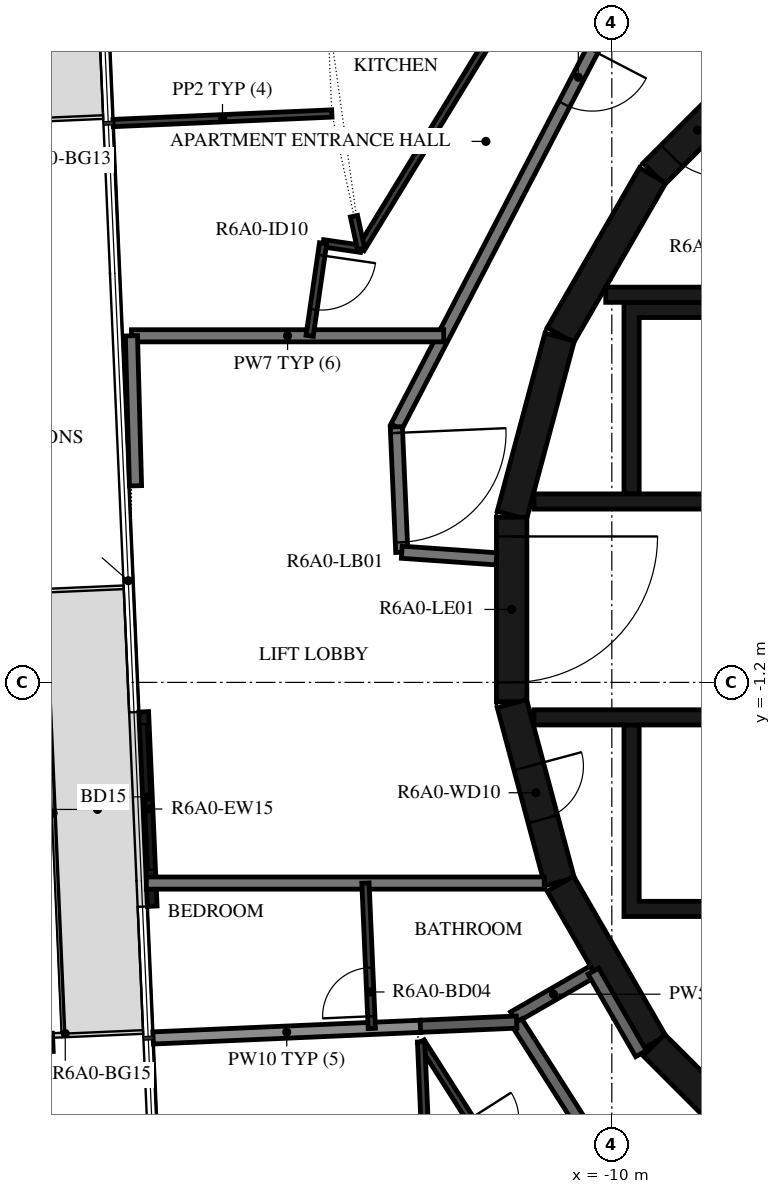
"""IFC4 building model, lengths in metres.
Left out: names, types, materials, properties, quantities, classifications, styles, units other than length and angle.
Written with IfcOpenShell. Run it as: python <this file> out.ifc"""

import sys

from ifc_helpers import new_model, si_unit, direction, frame, frame_2d, origin, origin_2d, place, context, subcontext, project, spatial, polyline, rectangle, i_section, outline, extrude, element, fill, save


model = new_model("IFC4")
c1 = context("Model", 3, precision=1e-05, world=origin(), true_north=direction((0.0, 1.0)))
c2 = subcontext(c1, "Body", "Model", "MODEL_VIEW")
j1 = project(units=[si_unit("LENGTHUNIT", "METRE"), si_unit("PLANEANGLEUNIT", "RADIAN")], contexts=[c1])
p1 = place(None, origin())
s1 = spatial("IfcSite", under=j1, at=p1, CompositionType="ELEMENT")
p2 = place(p1, origin())
s2 = spatial("IfcBuilding", under=s1, at=p2, CompositionType="ELEMENT")
p3 = place(p2, frame((0.0, 0.0, 233.7)))
s3 = spatial("IfcBuildingStorey", under=s2, at=p3, CompositionType="ELEMENT", Elevation=233.7)
p4 = place(p3, frame((-19.642, -7.139, -0.38), z_axis=(0.0, 0.0, 1.0), x_axis=(-0.043619010384, 0.999048238041, 0.0)))
e1 = element("IfcColumn", 1, at=p4, inside=s3, PredefinedType="COLUMN", context=c2, shape_type="SweptSolid", body=[
    extrude(i_section(OverallWidth=0.3, OverallDepth=0.9, WebThickness=0.019, FlangeThickness=0.035, FilletRadius=0.03, at=origin_2d()), origin(), (0.0, 0.0, 1.0), 3.5),
])
p5 = place(p3, frame((-17.698, -1.684, 0.0), z_axis=(0.0, 0.0, 1.0), x_axis=(0.043639181999, -0.999047357133, 0.0)))
e2 = element("IfcWall", 2, at=p5, inside=s3, PredefinedType="STANDARD", context=c2, shape_type="SweptSolid", body=[
    extrude(rectangle(XDim=3.2, YDim=0.16, at=frame_2d((1.6, 0.0))), origin(), (0.0, 0.0, 1.0), 3.12),
])
p6 = place(p5, frame((0.2, 0.0, 0.0)))
e3 = element("IfcOpeningElement", 3, at=p6, cuts=e2, PredefinedType="OPENING", context=c2, shape_type="SweptSolid", body=[
    extrude(rectangle(XDim=2.4, YDim=2.4, at=frame_2d((1.2, 1.2))), frame((0.0, 0.09, 0.0), z_axis=(0.0, -1.0, 0.0), x_axis=(1.0, 0.0, 0.0)), (0.0, 0.0, 1.0), 0.18),
])
p7 = place(p3, frame((-7.164, 9.308, 0.0), z_axis=(0.0, 0.0, 1.0), x_axis=(-0.707106781187, -0.707106781187, 0.0)))
e4 = element("IfcWall", 4, at=p7, inside=s3, PredefinedType="SHEAR", context=c2, shape_type="SweptSolid", body=[
    extrude(rectangle(XDim=3.032, YDim=0.5, at=frame_2d((1.516, 0.0))), origin(), (0.0, 0.0, 1.0), 3.12),
])
p8 = place(p7, frame((1.416, 0.0, 0.0)))
e5 = element("IfcOpeningElement", 5, at=p8, cuts=e4, PredefinedType="OPENING", context=c2, shape_type="SweptSolid", body=[
    extrude(rectangle(XDim=1.2, YDim=2.1, at=frame_2d((0.6, 1.05))), frame((0.0, 0.26, 0.0), z_axis=(0.0, -1.0, 0.0), x_axis=(1.0, 0.0, 0.0)), (0.0, 0.0, 1.0), 0.52),
])
for number, where, z_axis, x_axis in (
    (6, (-9.329, 7.137, 0.0), (0.0, 0.0, 1.0), (-0.5, -0.866, 0.0)),
    (7, (-10.858, 4.479, 0.0), (0.0, 0.0, 1.0), (-0.259, -0.966, 0.0)),
):
    element("IfcWall", number, at=place(p3, frame(where, z_axis=z_axis, x_axis=x_axis)), inside=s3, PredefinedType="SHEAR", context=c2, shape_type="SweptSolid", body=[
        extrude(rectangle(XDim=3.033, YDim=0.5, at=frame_2d((1.516, 0.0))), origin(), (0.0, 0.0, 1.0), 3.12),
    ])
p9 = place(p3, frame((-11.647, 1.516, 0.0), z_axis=(0.0, 0.0, 1.0), x_axis=(0.0, -1.0, 0.0)))
e8 = element("IfcWall", 8, at=p9, inside=s3, PredefinedType="SHEAR", context=c2, shape_type="SweptSolid", body=[
    extrude(rectangle(XDim=3.033, YDim=0.5, at=frame_2d((1.516, 0.0))), origin(), (0.0, 0.0, 1.0), 3.12),
])
p10 = place(p9, frame((0.316, 0.0, 0.0)))
e9 = element("IfcOpeningElement", 9, at=p10, cuts=e8, PredefinedType="OPENING", context=c2, shape_type="SweptSolid", body=[
    extrude(rectangle(XDim=2.4, YDim=2.1, at=frame_2d((1.2, 1.05))), frame((0.0, 0.26, 0.0), z_axis=(0.0, -1.0, 0.0), x_axis=(1.0, 0.0, 0.0)), (0.0, 0.0, 1.0), 0.52),
])
p11 = place(p3, frame((-11.643, -1.55, 0.0), z_axis=(0.0, 0.0, 1.0), x_axis=(0.258734743916, -0.965948410781, 0.0)))
e10 = element("IfcWall", 10, at=p11, inside=s3, PredefinedType="SHEAR", context=c2, shape_type="SweptSolid", body=[
    extrude(rectangle(XDim=3.033, YDim=0.5, at=frame_2d((1.516, 0.0))), origin(), (0.0, 0.0, 1.0), 3.12),
])
p12 = place(p11, frame((1.066, 0.0, 0.0)))
e11 = element("IfcOpeningElement", 11, at=p12, cuts=e10, PredefinedType="OPENING", context=c2, shape_type="SweptSolid", body=[
    extrude(rectangle(XDim=0.9, YDim=2.1, at=frame_2d((0.45, 1.05))), frame((0.0, 0.26, 0.0), z_axis=(0.0, -1.0, 0.0), x_axis=(1.0, 0.0, 0.0)), (0.0, 0.0, 1.0), 0.52),
])
p13 = place(p3, frame((-10.845, -4.51, 0.0), z_axis=(0.0, 0.0, 1.0), x_axis=(0.500087131594, -0.865975092491, 0.0)))
e12 = element("IfcWall", 12, at=p13, inside=s3, PredefinedType="SHEAR", context=c2, shape_type="SweptSolid", body=[
    extrude(rectangle(XDim=3.033, YDim=0.5, at=frame_2d((1.516, 0.0))), origin(), (0.0, 0.0, 1.0), 3.12),
])
p14 = place(p3, frame((-9.308, -7.164, 0.0), z_axis=(0.0, 0.0, 1.0), x_axis=(0.707106781187, -0.707106781187, 0.0)))
e13 = element("IfcWall", 13, at=p14, inside=s3, PredefinedType="SHEAR", context=c2, shape_type="SweptSolid", body=[
    extrude(rectangle(XDim=3.032, YDim=0.5, at=frame_2d((1.516, 0.0))), origin(), (0.0, 0.0, 1.0), 3.12),
])
p15 = place(p3, frame((-7.0, 5.175, 0.0), z_axis=(0.0, 0.0, 1.0), x_axis=(-1.0, 0.0, 0.0)))
e14 = element("IfcWall", 14, at=p15, inside=s3, PredefinedType="SHEAR", context=c2, shape_type="SweptSolid", body=[
    extrude(rectangle(XDim=3.1, YDim=0.25, at=frame_2d((1.55, 0.0))), origin(), (0.0, 0.0, 1.0), 3.12),
])
p16 = place(p3, origin())
e15 = element("IfcWall", 15, at=p16, inside=s3, PredefinedType="SHEAR", context=c2, shape_type="SweptSolid", body=[
    extrude(outline(polyline([(-9.55, 4.8), (-5.5, 4.8), (-5.5, 1.9), (-5.25, 1.9), (-5.25, 4.8), (-1.2, 4.8), (-1.2, 1.9), (-0.95, 1.9), (-0.95, 4.8), (0.95, 4.8), (0.95, 1.9), (1.2, 1.9), (1.2, 4.8), (3.1, 4.8), (3.1, 1.9), (3.35, 1.9), (3.35, 4.8), (5.25, 4.8), (5.25, 1.9), (5.5, 1.9), (5.5, 4.8), (7.4, 4.8), (7.4, 1.9), (7.65, 1.9), (7.65, 4.8), (9.55, 4.8), (9.55, 1.9), (9.8, 1.9), (9.8, 4.8), (9.8, 5.05), (-9.8, 5.05), (-9.8, 4.8), (-9.8, 1.9), (-9.55, 1.9), (-9.55, 4.8)])), origin(), (0.0, 0.0, 1.0), 3.12),
])
p17 = place(p3, origin())
e16 = element("IfcWall", 16, at=p17, inside=s3, PredefinedType="SHEAR", context=c2, shape_type="SweptSolid", body=[
    extrude(outline(polyline([(9.8, -5.05), (9.8, -4.8), (9.8, -1.9), (9.55, -1.9), (9.55, -4.8), (7.65, -4.8), (7.65, -1.9), (7.4, -1.9), (7.4, -4.8), (5.5, -4.8), (5.5, -1.9), (5.25, -1.9), (5.25, -4.8), (3.35, -4.8), (3.35, -1.9), (3.1, -1.9), (3.1, -4.8), (1.2, -4.8), (1.2, -1.9), (0.95, -1.9), (0.95, -4.8), (-0.95, -4.8), (-0.95, -1.9), (-1.2, -1.9), (-1.2, -4.8), (-5.25, -4.8), (-5.25, -1.9), (-5.5, -1.9), (-5.5, -4.8), (-7.4, -4.8), (-7.4, -1.9), (-7.65, -1.9), (-7.65, -4.8), (-9.55, -4.8), (-9.55, -1.9), (-9.8, -1.9), (-9.8, -4.8), (-9.8, -5.05), (9.8, -5.05)])), origin(), (0.0, 0.0, 1.0), 3.12),
])
p18 = place(p3, frame((-11.28, 1.775, 0.0), z_axis=(0.0, 0.0, 1.0), x_axis=(1.0, 0.0, 0.0)))
e17 = element("IfcWall", 17, at=p18, inside=s3, PredefinedType="SHEAR", context=c2, shape_type="SweptSolid", body=[
    extrude(rectangle(XDim=14.38, YDim=0.25, at=frame_2d((7.19, 0.0))), origin(), (0.0, 0.0, 1.0), 3.12),
])
p19 = place(p18, frame((10.73, 0.0, 0.0)))
e18 = element("IfcOpeningElement", 18, at=p19, cuts=e17, PredefinedType="OPENING", context=c2, shape_type="SweptSolid", body=[
    extrude(rectangle(XDim=1.1, YDim=2.1, at=frame_2d((0.55, 1.05))), frame((0.0, 0.135, 0.0), z_axis=(0.0, -1.0, 0.0), x_axis=(1.0, 0.0, 0.0)), (0.0, 0.0, 1.0), 0.27),
])
p20 = place(p18, frame((12.88, 0.0, 0.0)))
e19 = element("IfcOpeningElement", 19, at=p20, cuts=e17, PredefinedType="OPENING", context=c2, shape_type="SweptSolid", body=[
    extrude(rectangle(XDim=1.1, YDim=2.1, at=frame_2d((0.55, 1.05))), frame((0.0, 0.135, 0.0), z_axis=(0.0, -1.0, 0.0), x_axis=(1.0, 0.0, 0.0)), (0.0, 0.0, 1.0), 0.27),
])
p21 = place(p18, frame((3.305, 0.0, 0.0)))
e20 = element("IfcOpeningElement", 20, at=p21, cuts=e17, PredefinedType="OPENING", context=c2, shape_type="SweptSolid", body=[
    extrude(rectangle(XDim=0.9, YDim=2.1, at=frame_2d((0.45, 1.05))), frame((0.0, 0.135, 0.0), z_axis=(0.0, -1.0, 0.0), x_axis=(1.0, 0.0, 0.0)), (0.0, 0.0, 1.0), 0.27),
])
p22 = place(p18, frame((7.605, 0.0, 0.0)))
e21 = element("IfcOpeningElement", 21, at=p22, cuts=e17, PredefinedType="OPENING", context=c2, shape_type="SweptSolid", body=[
    extrude(rectangle(XDim=0.9, YDim=2.1, at=frame_2d((0.45, 1.05))), frame((0.0, 0.135, 0.0), z_axis=(0.0, -1.0, 0.0), x_axis=(1.0, 0.0, 0.0)), (0.0, 0.0, 1.0), 0.27),
])
p23 = place(p3, frame((-11.28, -1.775, 0.0), z_axis=(0.0, 0.0, 1.0), x_axis=(1.0, 0.0, 0.0)))
e22 = element("IfcWall", 22, at=p23, inside=s3, PredefinedType="SHEAR", context=c2, shape_type="SweptSolid", body=[
    extrude(rectangle(XDim=14.38, YDim=0.25, at=frame_2d((7.19, 0.0))), origin(), (0.0, 0.0, 1.0), 3.12),
])
p24 = place(p23, frame((12.88, 0.0, 0.0)))
e23 = element("IfcOpeningElement", 23, at=p24, cuts=e22, PredefinedType="OPENING", context=c2, shape_type="SweptSolid", body=[
    extrude(rectangle(XDim=1.1, YDim=2.1, at=frame_2d((0.55, 1.05))), frame((0.0, 0.135, 0.0), z_axis=(0.0, -1.0, 0.0), x_axis=(1.0, 0.0, 0.0)), (0.0, 0.0, 1.0), 0.27),
])
p25 = place(p23, frame((7.605, 0.0, 0.0)))
e24 = element("IfcOpeningElement", 24, at=p25, cuts=e22, PredefinedType="OPENING", context=c2, shape_type="SweptSolid", body=[
    extrude(rectangle(XDim=0.9, YDim=2.1, at=frame_2d((0.45, 1.05))), frame((0.0, 0.135, 0.0), z_axis=(0.0, -1.0, 0.0), x_axis=(1.0, 0.0, 0.0)), (0.0, 0.0, 1.0), 0.27),
])
p26 = place(p23, frame((10.83, 0.0, 0.0)))
e25 = element("IfcOpeningElement", 25, at=p26, cuts=e22, PredefinedType="OPENING", context=c2, shape_type="SweptSolid", body=[
    extrude(rectangle(XDim=0.9, YDim=2.1, at=frame_2d((0.45, 1.05))), frame((0.0, 0.135, 0.0), z_axis=(0.0, -1.0, 0.0), x_axis=(1.0, 0.0, 0.0)), (0.0, 0.0, 1.0), 0.27),
])
p27 = place(p3, frame((-10.228, 9.372, 0.0), z_axis=(0.0, 0.0, 1.0), x_axis=(-0.461759464021, -0.887005184532, 0.0)))
e26 = element("IfcWall", 26, at=p27, inside=s3, PredefinedType="STANDARD", context=c2, shape_type="SweptSolid", body=[
    extrude(rectangle(XDim=7.181, YDim=0.2, at=frame_2d((3.591, 0.0))), origin(), (0.0, 0.0, 1.0), 3.12),
])
p28 = place(p27, frame((0.2, 0.0, 0.0)))
e27 = element("IfcOpeningElement", 27, at=p28, cuts=e26, PredefinedType="OPENING", context=c2, shape_type="SweptSolid", body=[
    extrude(rectangle(XDim=1.0, YDim=2.1, at=frame_2d((0.5, 1.05))), frame((0.0, 0.11, 0.0), z_axis=(0.0, -1.0, 0.0), x_axis=(1.0, 0.0, 0.0)), (0.0, 0.0, 1.0), 0.22),
])
p29 = place(p3, frame((-13.544, 3.003, 0.0), z_axis=(0.0, 0.0, 1.0), x_axis=(0.043652842459, -0.99904676034, 0.0)))
e28 = element("IfcWall", 28, at=p29, inside=s3, PredefinedType="STANDARD", context=c2, shape_type="SweptSolid", body=[
    extrude(rectangle(XDim=2.064, YDim=0.2, at=frame_2d((1.032, 0.0))), origin(), (0.0, 0.0, 1.0), 3.12),
])
p30 = place(p29, frame((0.1, 0.0, 0.0)))
e29 = element("IfcOpeningElement", 29, at=p30, cuts=e28, PredefinedType="OPENING", context=c2, shape_type="SweptSolid", body=[
    extrude(rectangle(XDim=1.8, YDim=2.1, at=frame_2d((0.9, 1.05))), frame((0.0, 0.11, 0.0), z_axis=(0.0, -1.0, 0.0), x_axis=(1.0, 0.0, 0.0)), (0.0, 0.0, 1.0), 0.22),
])
p31 = place(p3, frame((-13.454, 0.941, 0.0), z_axis=(0.0, 0.0, 1.0), x_axis=(0.99755155062, -0.069934997354, 0.0)))
e30 = element("IfcWall", 30, at=p31, inside=s3, PredefinedType="STANDARD", context=c2, shape_type="SweptSolid", body=[
    extrude(rectangle(XDim=1.561, YDim=0.2, at=frame_2d((0.78, 0.0))), origin(), (0.0, 0.0, 1.0), 3.12),
])
p32 = place(p3, frame((-10.303, -5.949, 0.0), z_axis=(0.0, 0.0, 1.0), x_axis=(-0.866043382451, -0.499968858743, 0.0)))
e31 = element("IfcWall", 31, at=p32, inside=s3, PredefinedType="STANDARD", context=c2, shape_type="SweptSolid", body=[
    extrude(rectangle(XDim=1.515, YDim=0.2, at=frame_2d((0.758, 0.0))), origin(), (0.0, 0.0, 1.0), 3.12),
])
p33 = place(p3, frame((-9.52, -7.305, 0.0), z_axis=(0.0, 0.0, 1.0), x_axis=(-0.500028278809, 0.866009076391, 0.0)))
e32 = element("IfcWall", 32, at=p33, inside=s3, PredefinedType="STANDARD", context=c2, shape_type="SweptSolid", body=[
    extrude(rectangle(XDim=1.566, YDim=0.2, at=frame_2d((0.783, 0.0))), origin(), (0.0, 0.0, 1.0), 3.12),
])
p34 = place(p3, frame((-11.565, -6.786, 0.0), z_axis=(0.0, 0.0, 1.0), x_axis=(0.537297327359, -0.843392898958, 0.0)))
e33 = element("IfcWall", 33, at=p34, inside=s3, PredefinedType="STANDARD", context=c2, shape_type="SweptSolid", body=[
    extrude(rectangle(XDim=4.081, YDim=0.2, at=frame_2d((2.041, 0.0))), origin(), (0.0, 0.0, 1.0), 3.12),
])
p35 = place(p3, frame((-12.764, 4.5, 0.0), z_axis=(0.0, 0.0, 1.0), x_axis=(-1.0, 0.0, 0.0)))
e34 = element("IfcWall", 34, at=p35, inside=s3, PredefinedType="STANDARD", context=c2, shape_type="SweptSolid", body=[
    extrude(rectangle(XDim=5.135, YDim=0.2, at=frame_2d((2.568, 0.0))), origin(), (0.0, 0.0, 1.0), 3.12),
])
p36 = place(p3, frame((-17.9, 4.5, 0.0), z_axis=(0.0, 0.0, 1.0), x_axis=(0.027204178319, -0.999629897853, 0.0)))
e35 = element("IfcWall", 35, at=p36, inside=s3, PredefinedType="STANDARD", context=c2, shape_type="SweptSolid", body=[
    extrude(rectangle(XDim=2.468, YDim=0.2, at=frame_2d((1.234, 0.0))), origin(), (0.0, 0.0, 1.0), 3.12),
])
p37 = place(p3, frame((-17.655, -4.5, 0.0), z_axis=(0.0, 0.0, 1.0), x_axis=(1.0, 0.0, 0.0)))
e36 = element("IfcWall", 36, at=p37, inside=s3, PredefinedType="STANDARD", context=c2, shape_type="SweptSolid", body=[
    extrude(rectangle(XDim=6.543, YDim=0.2, at=frame_2d((3.272, 0.0))), origin(), (0.0, 0.0, 1.0), 3.12),
])
p38 = place(p3, frame((-17.544, -7.047, 0.0), z_axis=(0.0, 0.0, 1.0), x_axis=(0.99904608111, 0.043668384662, 0.0)))
e37 = element("IfcWall", 37, at=p38, inside=s3, PredefinedType="STANDARD", context=c2, shape_type="SweptSolid", body=[
    extrude(rectangle(XDim=4.4, YDim=0.2, at=frame_2d((2.2, 0.0))), origin(), (0.0, 0.0, 1.0), 2.73),
])
p39 = place(p3, frame((-13.148, -6.855, 0.0), z_axis=(0.0, 0.0, 1.0), x_axis=(0.999048583464, 0.043611098121, 0.0)))
e38 = element("IfcWall", 38, at=p39, inside=s3, PredefinedType="STANDARD", context=c2, shape_type="SweptSolid", body=[
    extrude(rectangle(XDim=1.584, YDim=0.2, at=frame_2d((0.792, 0.0))), origin(), (0.0, 0.0, 1.0), 3.12),
])
p40 = place(p3, frame((-11.373, 10.421, 0.0), z_axis=(0.0, 0.0, 1.0), x_axis=(-0.522435957358, -0.852678527031, 0.0)))
e39 = element("IfcWall", 39, at=p40, inside=s3, PredefinedType="PARTITIONING", context=c2, shape_type="SweptSolid", body=[
    extrude(rectangle(XDim=5.267, YDim=0.12, at=frame_2d((2.633, 0.0))), origin(), (0.0, 0.0, 1.0), 3.12),
])
p41 = place(p3, frame((-14.125, 5.931, 0.0), z_axis=(0.0, 0.0, 1.0), x_axis=(-0.989621518838, 0.143698467119, 0.0)))
e40 = element("IfcWall", 40, at=p41, inside=s3, PredefinedType="PARTITIONING", context=c2, shape_type="SweptSolid", body=[
    extrude(rectangle(XDim=0.63, YDim=0.12, at=frame_2d((0.315, 0.0))), origin(), (0.0, 0.0, 1.0), 3.12),
])
p42 = place(p3, frame((-14.748, 6.021, 0.0), z_axis=(0.0, 0.0, 1.0), x_axis=(-0.143888945672, -0.98959384159, 0.0)))
e41 = element("IfcWall", 41, at=p42, inside=s3, PredefinedType="PARTITIONING", context=c2, shape_type="SweptSolid", body=[
    extrude(rectangle(XDim=1.537, YDim=0.12, at=frame_2d((0.769, 0.0))), origin(), (0.0, 0.0, 1.0), 3.12),
])
p43 = place(p42, frame((0.2, 0.0, 0.0)))
e42 = element("IfcOpeningElement", 42, at=p43, cuts=e41, PredefinedType="OPENING", context=c2, shape_type="SweptSolid", body=[
    extrude(rectangle(XDim=0.9, YDim=2.1, at=frame_2d((0.45, 1.05))), frame((0.0, 0.07, 0.0), z_axis=(0.0, -1.0, 0.0), x_axis=(1.0, 0.0, 0.0)), (0.0, 0.0, 1.0), 0.14),
])
p44 = place(p3, frame((-14.24, 6.467, 0.0), z_axis=(0.0, 0.0, 1.0), x_axis=(0.210896225868, -0.977508456186, 0.0)))
e43 = element("IfcWall", 43, at=p44, inside=s3, PredefinedType="PARTITIONING", context=c2, shape_type="SweptSolid", body=[
    extrude(rectangle(XDim=0.549, YDim=0.12, at=frame_2d((0.274, 0.0))), origin(), (0.0, 0.0, 1.0), 3.12),
])
p45 = place(p3, frame((-18.201, 7.999, 0.0), z_axis=(0.0, 0.0, 1.0), x_axis=(0.999048850974, 0.043604969534, 0.0)))
e44 = element("IfcWall", 44, at=p45, inside=s3, PredefinedType="PARTITIONING", context=c2, shape_type="SweptSolid", body=[
    extrude(rectangle(XDim=3.6, YDim=0.12, at=frame_2d((1.8, 0.0))), origin(), (0.0, 0.0, 1.0), 2.73),
])
p46 = place(p3, frame((-13.947, -6.89, 0.0), z_axis=(0.0, 0.0, 1.0), x_axis=(-0.043680814195, 0.999045537737, 0.0)))
e45 = element("IfcWall", 45, at=p46, inside=s3, PredefinedType="PARTITIONING", context=c2, shape_type="SweptSolid", body=[
    extrude(rectangle(XDim=2.392, YDim=0.12, at=frame_2d((1.196, 0.0))), origin(), (0.0, 0.0, 1.0), 3.12),
])
p47 = place(p46, frame((0.2, 0.0, 0.0)))
e46 = element("IfcOpeningElement", 46, at=p47, cuts=e45, PredefinedType="OPENING", context=c2, shape_type="SweptSolid", body=[
    extrude(rectangle(XDim=0.8, YDim=2.1, at=frame_2d((0.4, 1.05))), frame((0.0, 0.07, 0.0), z_axis=(0.0, -1.0, 0.0), x_axis=(1.0, 0.0, 0.0)), (0.0, 0.0, 1.0), 0.14),
])
p48 = place(p3, frame((-13.137, -7.111, 0.0), z_axis=(0.0, 0.0, 1.0), x_axis=(0.537300549444, -0.843390846267, 0.0)))
e47 = element("IfcWall", 47, at=p48, inside=s3, PredefinedType="PARTITIONING", context=c2, shape_type="SweptSolid", body=[
    extrude(rectangle(XDim=5.054, YDim=0.12, at=frame_2d((2.527, 0.0))), origin(), (0.0, 0.0, 1.0), 3.12),
])
p49 = place(p48, frame((1.5, 0.0, 0.0)))
e48 = element("IfcOpeningElement", 48, at=p49, cuts=e47, PredefinedType="OPENING", context=c2, shape_type="SweptSolid", body=[
    extrude(rectangle(XDim=0.8, YDim=2.1, at=frame_2d((0.4, 1.05))), frame((0.0, 0.07, 0.0), z_axis=(0.0, -1.0, 0.0), x_axis=(1.0, 0.0, 0.0)), (0.0, 0.0, 1.0), 0.14),
])
p50 = place(p3, frame((-12.936, -11.703, 0.0), z_axis=(0.0, 0.0, 1.0), x_axis=(-0.043610108597, 0.999048626658, 0.0)))
e49 = element("IfcWall", 49, at=p50, inside=s3, PredefinedType="PARTITIONING", context=c2, shape_type="SweptSolid", body=[
    extrude(rectangle(XDim=4.596, YDim=0.12, at=frame_2d((2.298, 0.0))), origin(), (0.0, 0.0, 1.0), 3.12),
])
p51 = place(p6, origin())
e50 = element("IfcDoor", 50, at=p51, inside=s3, OperationType="DOUBLE_DOOR_SLIDING", PredefinedType="DOOR", context=c2, shape_type="SweptSolid", body=[
    extrude(rectangle(XDim=2.4, YDim=2.4, at=frame_2d((1.2, 1.2))), frame((0.0, 0.025, 0.0), z_axis=(0.0, -1.0, 0.0), x_axis=(1.0, 0.0, 0.0)), (0.0, 0.0, 1.0), 0.05),
])
fill(e3, e50)
p52 = place(p8, origin())
e51 = element("IfcDoor", 51, at=p52, inside=s3, OperationType="SINGLE_SWING_RIGHT", PredefinedType="DOOR", context=c2, shape_type="SweptSolid", body=[
    extrude(rectangle(XDim=1.2, YDim=2.1, at=frame_2d((0.6, 1.05))), frame((0.0, 0.025, 0.0), z_axis=(0.0, -1.0, 0.0), x_axis=(1.0, 0.0, 0.0)), (0.0, 0.0, 1.0), 0.05),
])
fill(e5, e51)
p53 = place(p10, origin())
e52 = element("IfcDoor", 52, at=p53, inside=s3, OperationType="DOUBLE_DOOR_SINGLE_SWING", PredefinedType="DOOR", context=c2, shape_type="SweptSolid", body=[
    extrude(rectangle(XDim=2.4, YDim=2.1, at=frame_2d((1.2, 1.05))), frame((0.0, 0.025, 0.0), z_axis=(0.0, -1.0, 0.0), x_axis=(1.0, 0.0, 0.0)), (0.0, 0.0, 1.0), 0.05),
])
fill(e9, e52)
p54 = place(p12, origin())
e53 = element("IfcDoor", 53, at=p54, inside=s3, OperationType="SINGLE_SWING_RIGHT", PredefinedType="DOOR", context=c2, shape_type="SweptSolid", body=[
    extrude(rectangle(XDim=0.9, YDim=2.1, at=frame_2d((0.45, 1.05))), frame((0.0, 0.025, 0.0), z_axis=(0.0, -1.0, 0.0), x_axis=(1.0, 0.0, 0.0)), (0.0, 0.0, 1.0), 0.05),
])
fill(e11, e53)
p55 = place(p28, origin())
e54 = element("IfcDoor", 54, at=p55, inside=s3, OperationType="SINGLE_SWING_LEFT", PredefinedType="DOOR", context=c2, shape_type="SweptSolid", body=[
    extrude(rectangle(XDim=1.0, YDim=2.1, at=frame_2d((0.5, 1.05))), frame((0.0, 0.025, 0.0), z_axis=(0.0, -1.0, 0.0), x_axis=(1.0, 0.0, 0.0)), (0.0, 0.0, 1.0), 0.05),
])
fill(e27, e54)
p56 = place(p43, origin())
e55 = element("IfcDoor", 55, at=p56, inside=s3, OperationType="SINGLE_SWING_LEFT", PredefinedType="DOOR", context=c2, shape_type="SweptSolid", body=[
    extrude(rectangle(XDim=0.9, YDim=2.1, at=frame_2d((0.45, 1.05))), frame((0.0, 0.025, 0.0), z_axis=(0.0, -1.0, 0.0), x_axis=(1.0, 0.0, 0.0)), (0.0, 0.0, 1.0), 0.05),
])
fill(e42, e55)
p57 = place(p47, origin())
e56 = element("IfcDoor", 56, at=p57, inside=s3, OperationType="SINGLE_SWING_LEFT", PredefinedType="DOOR", context=c2, shape_type="SweptSolid", body=[
    extrude(rectangle(XDim=0.8, YDim=2.1, at=frame_2d((0.4, 1.05))), frame((0.0, 0.025, 0.0), z_axis=(0.0, -1.0, 0.0), x_axis=(1.0, 0.0, 0.0)), (0.0, 0.0, 1.0), 0.05),
])
fill(e46, e56)
p58 = place(p30, origin())
e57 = element("IfcDoor", 57, at=p58, inside=s3, OperationType="DOUBLE_DOOR_SINGLE_SWING", PredefinedType="DOOR", context=c2, shape_type="SweptSolid", body=[
    extrude(rectangle(XDim=1.8, YDim=2.1, at=frame_2d((0.9, 1.05))), frame((0.0, 0.025, 0.0), z_axis=(0.0, -1.0, 0.0), x_axis=(1.0, 0.0, 0.0)), (0.0, 0.0, 1.0), 0.05),
])
fill(e29, e57)
save(model, sys.argv[1])
